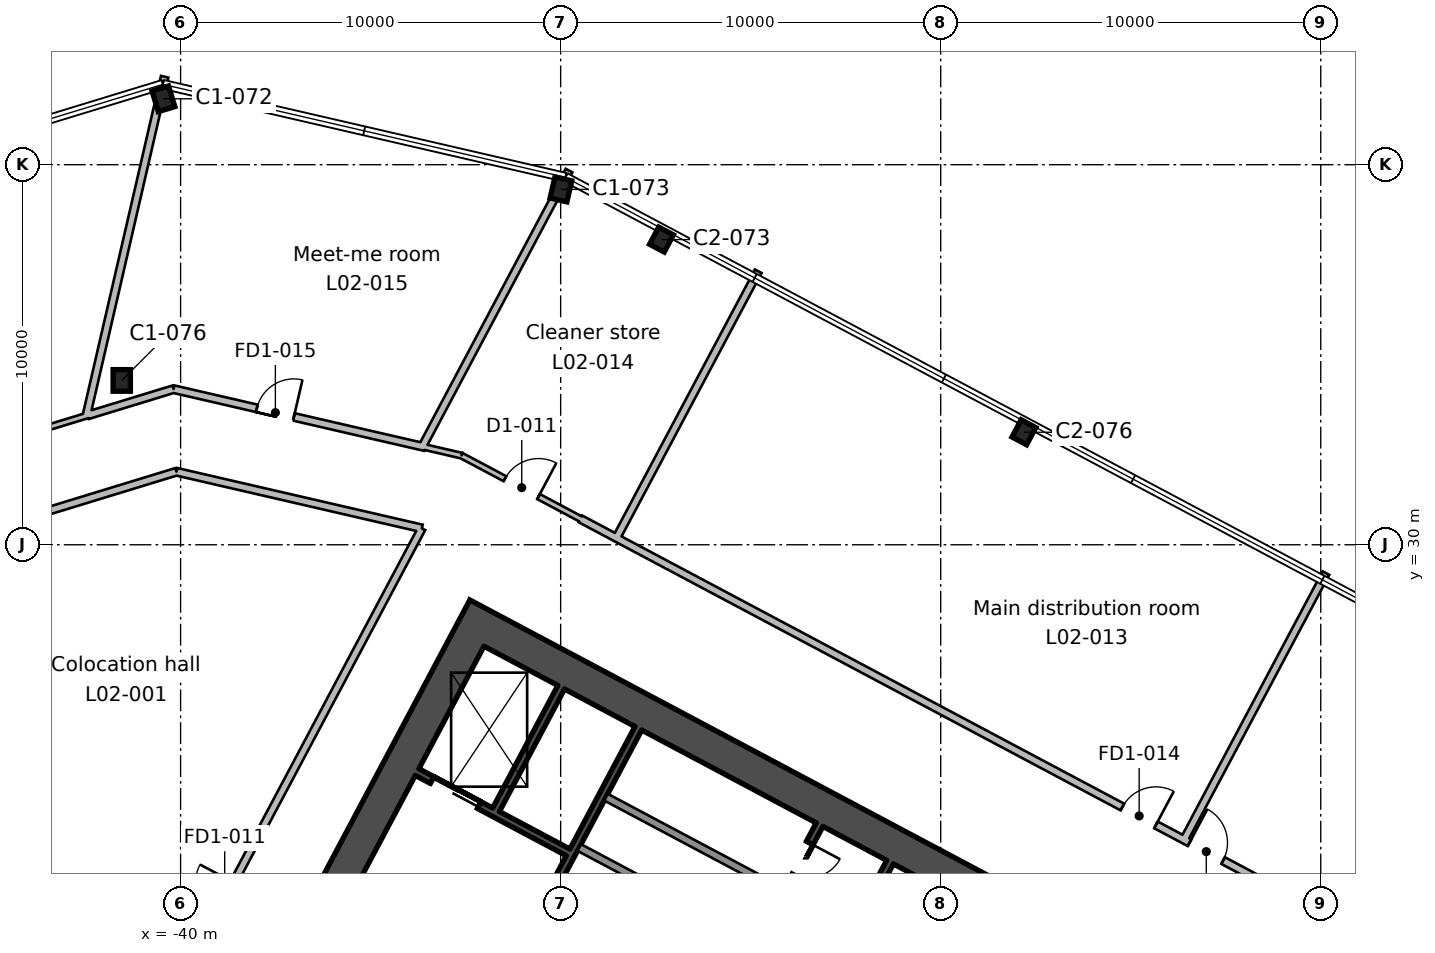
"""IFC4 building model, lengths in metres.
Left out: names, types, materials, properties, quantities, classifications, styles, units other than length and angle.
Written with IfcOpenShell. Run it as: python <this file> out.ifc"""

import sys

from ifc_helpers import new_model, si_unit, direction, frame, frame_2d, origin, origin_2d, place, context, subcontext, project, spatial, rectangle, i_section, extrude, element, fill, save


model = new_model("IFC4")
c1 = context("Model", 3, precision=1e-05, world=origin(), true_north=direction((0.0, 1.0)))
c2 = subcontext(c1, "Body", "Model", "MODEL_VIEW")
j1 = project(units=[si_unit("LENGTHUNIT", "METRE"), si_unit("PLANEANGLEUNIT", "RADIAN")], contexts=[c1])
p1 = place(None, origin())
s1 = spatial("IfcSite", under=j1, at=p1, CompositionType="ELEMENT")
p2 = place(p1, origin())
s2 = spatial("IfcBuilding", under=s1, at=p2, CompositionType="ELEMENT")
p3 = place(p2, frame((0.0, 0.0, 12.2)))
s3 = spatial("IfcBuildingStorey", under=s2, at=p3, CompositionType="ELEMENT", Elevation=12.2)
p4 = place(p3, frame((-17.811, 32.96, 0.0), z_axis=(0.0, 0.0, 1.0), x_axis=(-0.882947592859, 0.469471562786, 0.0)))
e1 = element("IfcColumn", 1, at=p4, inside=s3, PredefinedType="COLUMN", context=c2, shape_type="SweptSolid", body=[
    extrude(i_section(OverallWidth=0.437, OverallDepth=0.513, WebThickness=0.061, FlangeThickness=0.097, FilletRadius=0.015, at=origin_2d()), origin(), (0.0, 0.0, 1.0), 5.4),
])
p5 = place(p3, frame((-41.549, 34.324, 0.0), z_axis=(0.0, 0.0, 1.0), x_axis=(1.0, 0.0, 0.0)))
e2 = element("IfcColumn", 2, at=p5, inside=s3, PredefinedType="COLUMN", context=c2, shape_type="SweptSolid", body=[
    extrude(i_section(OverallWidth=0.455, OverallDepth=0.569, WebThickness=0.078, FlangeThickness=0.125, FilletRadius=0.015, at=origin_2d()), origin(), (0.0, 0.0, 1.0), 5.4),
])
p6 = place(p3, frame((-27.347, 38.03, 0.0), z_axis=(0.0, 0.0, 1.0), x_axis=(-0.882947592859, 0.469471562786, 0.0)))
e3 = element("IfcColumn", 3, at=p6, inside=s3, PredefinedType="COLUMN", context=c2, shape_type="SweptSolid", body=[
    extrude(i_section(OverallWidth=0.437, OverallDepth=0.513, WebThickness=0.061, FlangeThickness=0.097, FilletRadius=0.015, at=origin_2d()), origin(), (0.0, 0.0, 1.0), 5.4),
])
for number, where, z_axis, x_axis in (
    (4, (-29.993, 39.35, 0.0), (0.0, 0.0, 1.0), (-0.974, 0.225, 0.0)),
    (5, (-40.452, 41.734, 0.0), (0.0, 0.0, 1.0), (-0.956, -0.292, 0.0)),
):
    element("IfcColumn", number, at=place(p3, frame(where, z_axis=z_axis, x_axis=x_axis)), inside=s3, PredefinedType="COLUMN", context=c2, shape_type="SweptSolid", body=[
        extrude(i_section(OverallWidth=0.455, OverallDepth=0.569, WebThickness=0.078, FlangeThickness=0.125, FilletRadius=0.015, at=origin_2d()), origin(), (0.0, 0.0, 1.0), 5.4),
    ])
p7 = place(p3, frame((-31.992, 28.336, 0.0), z_axis=(0.0, 0.0, 1.0), x_axis=(-0.46947084998, -0.882947971864, 0.0)))
e6 = element("IfcWall", 6, at=p7, inside=s3, PredefinedType="SHEAR", context=c2, shape_type="SweptSolid", body=[
    extrude(rectangle(XDim=20.0, YDim=0.9, at=frame_2d((10.0, 0.0))), origin(), (0.0, 0.0, 1.0), 5.4),
])
p8 = place(p7, frame((10.6, 0.0, 0.0)))
e7 = element("IfcOpeningElement", 7, at=p8, cuts=e6, PredefinedType="OPENING", context=c2, shape_type="SweptSolid", body=[
    extrude(rectangle(XDim=2.4, YDim=2.4, at=frame_2d((1.2, 1.2))), frame((0.0, 0.46, 0.0), z_axis=(0.0, -1.0, 0.0), x_axis=(1.0, 0.0, 0.0)), (0.0, 0.0, 1.0), 0.92),
])
p9 = place(p3, frame((-13.97, 18.244, 0.0), z_axis=(0.0, 0.0, 1.0), x_axis=(-0.88294509198, 0.469476266226, 0.0)))
e8 = element("IfcWall", 8, at=p9, inside=s3, PredefinedType="SHEAR", context=c2, shape_type="SweptSolid", body=[
    extrude(rectangle(XDim=20.2, YDim=0.9, at=frame_2d((10.1, 0.0))), origin(), (0.0, 0.0, 1.0), 5.4),
])
p10 = place(p3, frame((-21.333, 21.649, 0.0), z_axis=(0.0, 0.0, 1.0), x_axis=(-0.469494272526, -0.882935517501, 0.0)))
e9 = element("IfcWall", 9, at=p10, inside=s3, PredefinedType="SHEAR", context=c2, shape_type="SweptSolid", body=[
    extrude(rectangle(XDim=7.3, YDim=0.2, at=frame_2d((3.65, 0.0))), origin(), (0.0, 0.0, 1.0), 5.4),
])
p11 = place(p10, frame((1.3, 0.0, 0.0)))
e10 = element("IfcOpeningElement", 10, at=p11, cuts=e9, PredefinedType="OPENING", context=c2, shape_type="SweptSolid", body=[
    extrude(rectangle(XDim=1.2, YDim=2.1, at=frame_2d((0.6, 1.05))), frame((0.0, 0.11, 0.0), z_axis=(0.0, -1.0, 0.0), x_axis=(1.0, 0.0, 0.0)), (0.0, 0.0, 1.0), 0.22),
])
p12 = place(p3, frame((-23.188, 22.635, 0.0), z_axis=(0.0, 0.0, 1.0), x_axis=(-0.469454336211, -0.882956752176, 0.0)))
e11 = element("IfcWall", 11, at=p12, inside=s3, PredefinedType="SHEAR", context=c2, shape_type="SweptSolid", body=[
    extrude(rectangle(XDim=7.3, YDim=0.2, at=frame_2d((3.65, 0.0))), origin(), (0.0, 0.0, 1.0), 5.4),
])
p13 = place(p12, frame((0.55, 0.0, 0.0)))
e12 = element("IfcOpeningElement", 12, at=p13, cuts=e11, PredefinedType="OPENING", context=c2, shape_type="SweptSolid", body=[
    extrude(rectangle(XDim=0.9, YDim=2.1, at=frame_2d((0.45, 1.05))), frame((0.0, 0.11, 0.0), z_axis=(0.0, -1.0, 0.0), x_axis=(1.0, 0.0, 0.0)), (0.0, 0.0, 1.0), 0.22),
])
p14 = place(p12, frame((2.3, 0.0, 0.0)))
e13 = element("IfcOpeningElement", 13, at=p14, cuts=e11, PredefinedType="OPENING", context=c2, shape_type="SweptSolid", body=[
    extrude(rectangle(XDim=0.9, YDim=2.1, at=frame_2d((0.45, 1.05))), frame((0.0, 0.11, 0.0), z_axis=(0.0, -1.0, 0.0), x_axis=(1.0, 0.0, 0.0)), (0.0, 0.0, 1.0), 0.22),
])
p15 = place(p12, frame((3.8, 0.0, 0.0)))
e14 = element("IfcOpeningElement", 14, at=p15, cuts=e11, PredefinedType="OPENING", context=c2, shape_type="SweptSolid", body=[
    extrude(rectangle(XDim=0.9, YDim=2.1, at=frame_2d((0.45, 1.05))), frame((0.0, 0.11, 0.0), z_axis=(0.0, -1.0, 0.0), x_axis=(1.0, 0.0, 0.0)), (0.0, 0.0, 1.0), 0.22),
])
p16 = place(p3, frame((-27.955, 25.171, 0.0), z_axis=(0.0, 0.0, 1.0), x_axis=(-0.469480409012, -0.88294288918, 0.0)))
e15 = element("IfcWall", 15, at=p16, inside=s3, PredefinedType="SHEAR", context=c2, shape_type="SweptSolid", body=[
    extrude(rectangle(XDim=7.3, YDim=0.2, at=frame_2d((3.65, 0.0))), origin(), (0.0, 0.0, 1.0), 5.4),
])
p17 = place(p3, frame((-29.986, 26.25, 0.0), z_axis=(0.0, 0.0, 1.0), x_axis=(-0.469494272526, -0.882935517501, 0.0)))
e16 = element("IfcWall", 16, at=p17, inside=s3, PredefinedType="SHEAR", context=c2, shape_type="SweptSolid", body=[
    extrude(rectangle(XDim=3.65, YDim=0.2, at=frame_2d((1.825, 0.0))), origin(), (0.0, 0.0, 1.0), 5.4),
])
p18 = place(p3, frame((-24.215, 20.917, 0.0), z_axis=(0.0, 0.0, 1.0), x_axis=(-0.882964314875, 0.469440111896, 0.0)))
e17 = element("IfcWall", 17, at=p18, inside=s3, PredefinedType="SOLIDWALL", context=c2, shape_type="SweptSolid", body=[
    extrude(rectangle(XDim=5.2, YDim=0.2, at=frame_2d((2.6, 0.0))), origin(), (0.0, 0.0, 1.0), 5.4),
])
p19 = place(p3, frame((-24.919, 19.592, 0.0), z_axis=(0.0, 0.0, 1.0), x_axis=(-0.882953967957, 0.469459572775, 0.0)))
e18 = element("IfcWall", 18, at=p19, inside=s3, PredefinedType="SOLIDWALL", context=c2, shape_type="SweptSolid", body=[
    extrude(rectangle(XDim=5.2, YDim=0.2, at=frame_2d((2.6, 0.0))), origin(), (0.0, 0.0, 1.0), 5.4),
])
p20 = place(p3, frame((-29.804, 21.906, 0.0), z_axis=(0.0, 0.0, 1.0), x_axis=(-0.882960433586, 0.469447412093, 0.0)))
e19 = element("IfcWall", 19, at=p20, inside=s3, PredefinedType="SHEAR", context=c2, shape_type="SweptSolid", body=[
    extrude(rectangle(XDim=4.5, YDim=0.2, at=frame_2d((2.25, 0.0))), origin(), (0.0, 0.0, 1.0), 5.4),
])
p21 = place(p20, frame((2.65, 0.0, 0.0)))
e20 = element("IfcOpeningElement", 20, at=p21, cuts=e19, PredefinedType="OPENING", context=c2, shape_type="SweptSolid", body=[
    extrude(rectangle(XDim=1.4, YDim=2.4, at=frame_2d((0.7, 1.2))), frame((0.0, 0.11, 0.0), z_axis=(0.0, -1.0, 0.0), x_axis=(1.0, 0.0, 0.0)), (0.0, 0.0, 1.0), 0.22),
])
p22 = place(p3, frame((-42.449, 33.403, 0.0), z_axis=(0.0, 0.0, 1.0), x_axis=(-0.956294478368, -0.292405319109, 0.0)))
e21 = element("IfcWall", 21, at=p22, inside=s3, PredefinedType="PARTITIONING", context=c2, shape_type="SweptSolid", body=[
    extrude(rectangle(XDim=4.35, YDim=0.15, at=frame_2d((2.175, 0.0))), origin(), (0.0, 0.0, 1.0), 4.95),
])
p23 = place(p22, frame((1.788, 0.0, 0.0)))
e22 = element("IfcOpeningElement", 22, at=p23, cuts=e21, PredefinedType="OPENING", context=c2, shape_type="SweptSolid", body=[
    extrude(rectangle(XDim=1.0, YDim=2.1, at=frame_2d((0.5, 1.05))), frame((0.0, 0.085, 0.0), z_axis=(0.0, -1.0, 0.0), x_axis=(1.0, 0.0, 0.0)), (0.0, 0.0, 1.0), 0.17),
])
p24 = place(p3, frame((-45.457, 30.287, 0.0), z_axis=(0.0, 0.0, 1.0), x_axis=(0.956290198193, 0.292419316803, 0.0)))
e23 = element("IfcWall", 23, at=p24, inside=s3, PredefinedType="PARTITIONING", context=c2, shape_type="SweptSolid", body=[
    extrude(rectangle(XDim=5.591, YDim=0.2, at=frame_2d((2.796, 0.0))), origin(), (0.0, 0.0, 1.0), 4.95),
])
p25 = place(p3, frame((-40.11, 31.922, 0.0), z_axis=(0.0, 0.0, 1.0), x_axis=(0.974361387977, -0.224988634423, 0.0)))
e24 = element("IfcWall", 24, at=p25, inside=s3, PredefinedType="PARTITIONING", context=c2, shape_type="SweptSolid", body=[
    extrude(rectangle(XDim=6.628, YDim=0.2, at=frame_2d((3.314, 0.0))), origin(), (0.0, 0.0, 1.0), 4.95),
])
p26 = place(p3, frame((-33.652, 30.431, 0.0), z_axis=(0.0, 0.0, 1.0), x_axis=(-0.469497028511, -0.882934052021, 0.0)))
e25 = element("IfcWall", 25, at=p26, inside=s3, PredefinedType="PARTITIONING", context=c2, shape_type="SweptSolid", body=[
    extrude(rectangle(XDim=22.141, YDim=0.2, at=frame_2d((11.07, 0.0))), origin(), (0.0, 0.0, 1.0), 4.95),
])
p27 = place(p26, frame((10.55, 0.0, 0.0)))
e26 = element("IfcOpeningElement", 26, at=p27, cuts=e25, PredefinedType="OPENING", context=c2, shape_type="SweptSolid", body=[
    extrude(rectangle(XDim=1.0, YDim=2.1, at=frame_2d((0.5, 1.05))), frame((0.0, 0.11, 0.0), z_axis=(0.0, -1.0, 0.0), x_axis=(1.0, 0.0, 0.0)), (0.0, 0.0, 1.0), 0.22),
])
p28 = place(p3, frame((-40.419, 42.315, 0.0), z_axis=(0.0, 0.0, 1.0), x_axis=(-0.225003617867, -0.974357928046, 0.0)))
e27 = element("IfcWall", 27, at=p28, inside=s3, PredefinedType="PARTITIONING", context=c2, shape_type="SweptSolid", body=[
    extrude(rectangle(XDim=9.156, YDim=0.2, at=frame_2d((4.578, 0.0))), origin(), (0.0, 0.0, 1.0), 4.95),
])
p29 = place(p3, frame((-40.185, 34.095, 0.0), z_axis=(0.0, 0.0, 1.0), x_axis=(-0.956334756987, -0.292273557781, 0.0)))
e28 = element("IfcWall", 28, at=p29, inside=s3, PredefinedType="PARTITIONING", context=c2, shape_type="SweptSolid", body=[
    extrude(rectangle(XDim=2.367, YDim=0.2, at=frame_2d((1.184, 0.0))), origin(), (0.0, 0.0, 1.0), 4.95),
])
p30 = place(p3, frame((-40.186, 34.095, 0.0), z_axis=(0.0, 0.0, 1.0), x_axis=(0.974351478487, -0.225031545278, 0.0)))
e29 = element("IfcWall", 29, at=p30, inside=s3, PredefinedType="PARTITIONING", context=c2, shape_type="SweptSolid", body=[
    extrude(rectangle(XDim=5.493, YDim=0.2, at=frame_2d((2.747, 0.0))), origin(), (0.0, 0.0, 1.0), 4.95),
])
p31 = place(p30, frame((2.25, 0.0, 0.0)))
e30 = element("IfcOpeningElement", 30, at=p31, cuts=e29, PredefinedType="OPENING", context=c2, shape_type="SweptSolid", body=[
    extrude(rectangle(XDim=1.0, YDim=2.1, at=frame_2d((0.5, 1.05))), frame((0.0, 0.11, 0.0), z_axis=(0.0, -1.0, 0.0), x_axis=(1.0, 0.0, 0.0)), (0.0, 0.0, 1.0), 0.22),
])
p32 = place(p3, frame((-34.834, 32.859, 0.0), z_axis=(0.0, 0.0, 1.0), x_axis=(0.974505369621, -0.224364178469, 0.0)))
e31 = element("IfcWall", 31, at=p32, inside=s3, PredefinedType="PARTITIONING", context=c2, shape_type="SweptSolid", body=[
    extrude(rectangle(XDim=1.296, YDim=0.2, at=frame_2d((0.648, 0.0))), origin(), (0.0, 0.0, 1.0), 4.95),
])
p33 = place(p3, frame((-29.779, 39.846, 0.0), z_axis=(0.0, 0.0, 1.0), x_axis=(-0.469432289294, -0.882968473824, 0.0)))
e32 = element("IfcWall", 32, at=p33, inside=s3, PredefinedType="PARTITIONING", context=c2, shape_type="SweptSolid", body=[
    extrude(rectangle(XDim=8.224, YDim=0.2, at=frame_2d((4.112, 0.0))), origin(), (0.0, 0.0, 1.0), 4.95),
])
p34 = place(p3, frame((-29.479, 30.681, 0.0), z_axis=(0.0, 0.0, 1.0), x_axis=(-0.882984687867, 0.469401790572, 0.0)))
e33 = element("IfcWall", 33, at=p34, inside=s3, PredefinedType="PARTITIONING", context=c2, shape_type="SweptSolid", body=[
    extrude(rectangle(XDim=3.547, YDim=0.15, at=frame_2d((1.773, 0.0))), origin(), (0.0, 0.0, 1.0), 4.95),
])
p35 = place(p34, frame((1.25, 0.0, 0.0)))
e34 = element("IfcOpeningElement", 34, at=p35, cuts=e33, PredefinedType="OPENING", context=c2, shape_type="SweptSolid", body=[
    extrude(rectangle(XDim=1.0, YDim=2.1, at=frame_2d((0.5, 1.05))), frame((0.0, 0.085, 0.0), z_axis=(0.0, -1.0, 0.0), x_axis=(1.0, 0.0, 0.0)), (0.0, 0.0, 1.0), 0.17),
])
p36 = place(p3, frame((-32.611, 32.346, 0.0), z_axis=(0.0, 0.0, 1.0), x_axis=(-0.974249018353, 0.225474721948, 0.0)))
e35 = element("IfcWall", 35, at=p36, inside=s3, PredefinedType="PARTITIONING", context=c2, shape_type="SweptSolid", body=[
    extrude(rectangle(XDim=0.985, YDim=0.15, at=frame_2d((0.493, 0.0))), origin(), (0.0, 0.0, 1.0), 4.95),
])
p37 = place(p3, frame((-29.479, 30.681, 0.0), z_axis=(0.0, 0.0, 1.0), x_axis=(0.882953009593, -0.469461375249, 0.0)))
e36 = element("IfcWall", 36, at=p37, inside=s3, PredefinedType="PARTITIONING", context=c2, shape_type="SweptSolid", body=[
    extrude(rectangle(XDim=33.387, YDim=0.2, at=frame_2d((16.693, 0.0))), origin(), (0.0, 0.0, 1.0), 4.95),
])
p38 = place(p37, frame((18.15, 0.0, 0.0)))
e37 = element("IfcOpeningElement", 37, at=p38, cuts=e36, PredefinedType="OPENING", context=c2, shape_type="SweptSolid", body=[
    extrude(rectangle(XDim=1.0, YDim=2.1, at=frame_2d((0.5, 1.05))), frame((0.0, 0.11, 0.0), z_axis=(0.0, -1.0, 0.0), x_axis=(1.0, 0.0, 0.0)), (0.0, 0.0, 1.0), 0.22),
])
p39 = place(p37, frame((16.15, 0.0, 0.0)))
e38 = element("IfcOpeningElement", 38, at=p39, cuts=e36, PredefinedType="OPENING", context=c2, shape_type="SweptSolid", body=[
    extrude(rectangle(XDim=1.0, YDim=2.1, at=frame_2d((0.5, 1.05))), frame((0.0, 0.11, 0.0), z_axis=(0.0, -1.0, 0.0), x_axis=(1.0, 0.0, 0.0)), (0.0, 0.0, 1.0), 0.22),
])
p40 = place(p3, frame((-24.8, 37.197, 0.0), z_axis=(0.0, 0.0, 1.0), x_axis=(-0.469551855795, -0.882904895625, 0.0)))
e39 = element("IfcWall", 39, at=p40, inside=s3, PredefinedType="PARTITIONING", context=c2, shape_type="SweptSolid", body=[
    extrude(rectangle(XDim=7.95, YDim=0.2, at=frame_2d((3.975, 0.0))), origin(), (0.0, 0.0, 1.0), 4.95),
])
p41 = place(p3, frame((-9.864, 29.255, 0.0), z_axis=(0.0, 0.0, 1.0), x_axis=(-0.469468822461, -0.88294904991, 0.0)))
e40 = element("IfcWall", 40, at=p41, inside=s3, PredefinedType="PARTITIONING", context=c2, shape_type="SweptSolid", body=[
    extrude(rectangle(XDim=7.949, YDim=0.2, at=frame_2d((3.975, 0.0))), origin(), (0.0, 0.0, 1.0), 4.95),
])
p42 = place(p21, origin())
e41 = element("IfcDoor", 41, at=p42, inside=s3, OperationType="DOUBLE_DOOR_SLIDING", PredefinedType="DOOR", context=c2, shape_type="SweptSolid", body=[
    extrude(rectangle(XDim=1.4, YDim=2.4, at=frame_2d((0.7, 1.2))), frame((0.0, 0.025, 0.0), z_axis=(0.0, -1.0, 0.0), x_axis=(1.0, 0.0, 0.0)), (0.0, 0.0, 1.0), 0.05),
])
fill(e20, e41)
p43 = place(p13, origin())
e42 = element("IfcDoor", 42, at=p43, inside=s3, OperationType="SINGLE_SWING_LEFT", PredefinedType="DOOR", context=c2, shape_type="SweptSolid", body=[
    extrude(rectangle(XDim=0.9, YDim=2.1, at=frame_2d((0.45, 1.05))), frame((0.0, 0.025, 0.0), z_axis=(0.0, -1.0, 0.0), x_axis=(1.0, 0.0, 0.0)), (0.0, 0.0, 1.0), 0.05),
])
fill(e12, e42)
p44 = place(p38, origin())
e43 = element("IfcDoor", 43, at=p44, inside=s3, OperationType="SINGLE_SWING_LEFT", PredefinedType="DOOR", context=c2, shape_type="SweptSolid", body=[
    extrude(rectangle(XDim=1.0, YDim=2.1, at=frame_2d((0.5, 1.05))), frame((0.0, 0.025, 0.0), z_axis=(0.0, -1.0, 0.0), x_axis=(1.0, 0.0, 0.0)), (0.0, 0.0, 1.0), 0.05),
])
fill(e37, e43)
p45 = place(p39, origin())
e44 = element("IfcDoor", 44, at=p45, inside=s3, OperationType="SINGLE_SWING_RIGHT", PredefinedType="DOOR", context=c2, shape_type="SweptSolid", body=[
    extrude(rectangle(XDim=1.0, YDim=2.1, at=frame_2d((0.5, 1.05))), frame((0.0, 0.025, 0.0), z_axis=(0.0, -1.0, 0.0), x_axis=(1.0, 0.0, 0.0)), (0.0, 0.0, 1.0), 0.05),
])
fill(e38, e44)
p46 = place(p35, frame((1.0, 0.0, 0.0), z_axis=(0.0, 0.0, 1.0), x_axis=(-1.0, 0.0, 0.0)))
e45 = element("IfcDoor", 45, at=p46, inside=s3, OperationType="SINGLE_SWING_RIGHT", PredefinedType="DOOR", context=c2, shape_type="SweptSolid", body=[
    extrude(rectangle(XDim=1.0, YDim=2.1, at=frame_2d((0.5, 1.05))), frame((0.0, 0.025, 0.0), z_axis=(0.0, -1.0, 0.0), x_axis=(1.0, 0.0, 0.0)), (0.0, 0.0, 1.0), 0.05),
])
fill(e34, e45)
p47 = place(p31, origin())
e46 = element("IfcDoor", 46, at=p47, inside=s3, OperationType="SINGLE_SWING_RIGHT", PredefinedType="DOOR", context=c2, shape_type="SweptSolid", body=[
    extrude(rectangle(XDim=1.0, YDim=2.1, at=frame_2d((0.5, 1.05))), frame((0.0, 0.025, 0.0), z_axis=(0.0, -1.0, 0.0), x_axis=(1.0, 0.0, 0.0)), (0.0, 0.0, 1.0), 0.05),
])
fill(e30, e46)
save(model, sys.argv[1])
